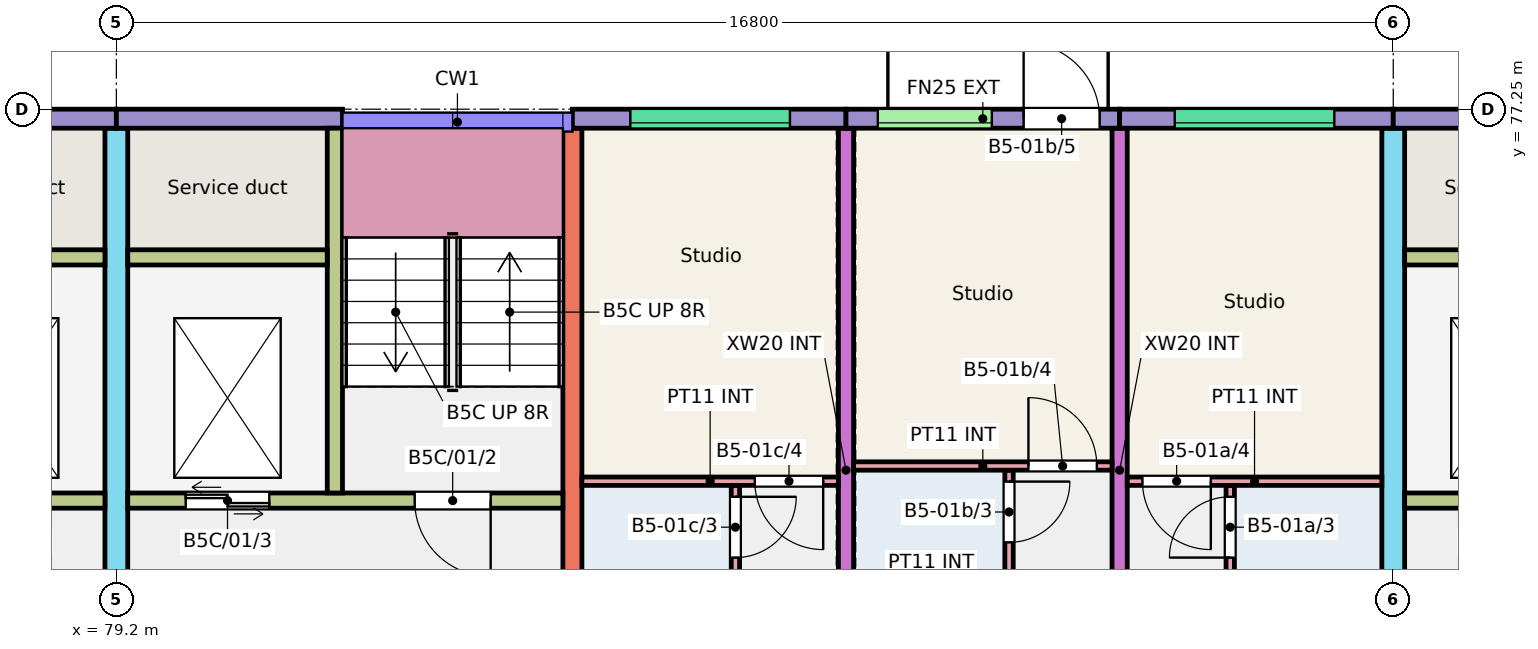
"""IFC4 building model, lengths in metres.
Left out: names, types, materials, properties, quantities, classifications, styles, units other than length and angle.
Written with IfcOpenShell. Run it as: python <this file> out.ifc"""

import sys

from ifc_helpers import new_model, si_unit, direction, frame, frame_2d, origin, place, context, subcontext, project, spatial, rectangle, extrude, element, fill, save


model = new_model("IFC4")
c1 = context("Model", 3, precision=1e-05, world=origin(), true_north=direction((0.0, 1.0)))
c2 = subcontext(c1, "Body", "Model", "MODEL_VIEW")
j1 = project(units=[si_unit("LENGTHUNIT", "METRE"), si_unit("PLANEANGLEUNIT", "RADIAN")], contexts=[c1])
p1 = place(None, origin())
s1 = spatial("IfcSite", under=j1, at=p1, CompositionType="ELEMENT")
p2 = place(p1, origin())
s2 = spatial("IfcBuilding", under=s1, at=p2, CompositionType="ELEMENT")
p3 = place(p2, frame((0.0, 0.0, 3.0)))
s3 = spatial("IfcBuildingStorey", under=s2, at=p3, CompositionType="ELEMENT", Elevation=3.0)
p4 = place(p3, frame((79.2, 66.0, 0.0), z_axis=(0.0, 0.0, 1.0), x_axis=(0.0, 1.0, 0.0)))
e1 = element("IfcWall", 1, at=p4, inside=s3, PredefinedType="SHEAR", context=c2, shape_type="SweptSolid", body=[
    extrude(rectangle(XDim=11.0, YDim=0.3, at=frame_2d((5.5, 0.0))), origin(), (0.0, 0.0, 1.0), 3.0),
])
p5 = place(p4, frame((0.3, 0.0, 0.0)))
e2 = element("IfcOpeningElement", 2, at=p5, cuts=e1, PredefinedType="OPENING", context=c2, shape_type="SweptSolid", body=[
    extrude(rectangle(XDim=1.2, YDim=2.1, at=frame_2d((0.6, 1.05))), frame((0.0, 0.16, 0.0), z_axis=(0.0, -1.0, 0.0), x_axis=(1.0, 0.0, 0.0)), (0.0, 0.0, 1.0), 0.32),
])
p6 = place(p3, frame((85.2, 68.0, 0.0), z_axis=(0.0, 0.0, 1.0), x_axis=(0.0, 1.0, 0.0)))
e3 = element("IfcWall", 3, at=p6, inside=s3, PredefinedType="SHEAR", context=c2, shape_type="SweptSolid", body=[
    extrude(rectangle(XDim=9.0, YDim=0.25, at=frame_2d((4.5, 0.0))), origin(), (0.0, 0.0, 1.0), 3.0),
])
for number, where, z_axis, x_axis in (
    (4, (88.8, 68.0, 0.0), (0.0, 0.0, 1.0), (0.0, 1.0, 0.0)),
    (5, (92.4, 68.0, 0.0), (0.0, 0.0, 1.0), (0.0, 1.0, 0.0)),
):
    element("IfcWall", number, at=place(p3, frame(where, z_axis=z_axis, x_axis=x_axis)), inside=s3, PredefinedType="SHEAR", context=c2, shape_type="SweptSolid", body=[
        extrude(rectangle(XDim=9.0, YDim=0.2, at=frame_2d((4.5, 0.0))), origin(), (0.0, 0.0, 1.0), 3.0),
    ])
p7 = place(p3, frame((96.0, 66.0, 0.0), z_axis=(0.0, 0.0, 1.0), x_axis=(0.0, 1.0, 0.0)))
e6 = element("IfcWall", 6, at=p7, inside=s3, PredefinedType="SHEAR", context=c2, shape_type="SweptSolid", body=[
    extrude(rectangle(XDim=11.0, YDim=0.3, at=frame_2d((5.5, 0.0))), origin(), (0.0, 0.0, 1.0), 3.0),
])
p8 = place(p7, frame((0.3, 0.0, 0.0)))
e7 = element("IfcOpeningElement", 7, at=p8, cuts=e6, PredefinedType="OPENING", context=c2, shape_type="SweptSolid", body=[
    extrude(rectangle(XDim=1.2, YDim=2.1, at=frame_2d((0.6, 1.05))), frame((0.0, 0.16, 0.0), z_axis=(0.0, -1.0, 0.0), x_axis=(1.0, 0.0, 0.0)), (0.0, 0.0, 1.0), 0.32),
])
p9 = place(p3, frame((76.225, 77.125, 0.0), z_axis=(0.0, 0.0, 1.0), x_axis=(1.0, 0.0, 0.0)))
e8 = element("IfcWall", 8, at=p9, inside=s3, PredefinedType="SOLIDWALL", context=c2, shape_type="SweptSolid", body=[
    extrude(rectangle(XDim=2.975, YDim=0.25, at=frame_2d((1.487, 0.0))), origin(), (0.0, 0.0, 1.0), 3.0),
])
p10 = place(p3, frame((73.325, 72.1, 0.0), z_axis=(0.0, 0.0, 1.0), x_axis=(1.0, 0.0, 0.0)))
e9 = element("IfcWall", 9, at=p10, inside=s3, PredefinedType="SHEAR", context=c2, shape_type="SweptSolid", body=[
    extrude(rectangle(XDim=5.725, YDim=0.2, at=frame_2d((2.863, 0.0))), origin(), (0.0, 0.0, 1.0), 3.0),
])
p11 = place(p10, frame((0.95, 0.0, 0.0)))
e10 = element("IfcOpeningElement", 10, at=p11, cuts=e9, PredefinedType="OPENING", context=c2, shape_type="SweptSolid", body=[
    extrude(rectangle(XDim=1.0, YDim=2.1, at=frame_2d((0.5, 1.05))), frame((0.0, 0.11, 0.0), z_axis=(0.0, -1.0, 0.0), x_axis=(1.0, 0.0, 0.0)), (0.0, 0.0, 1.0), 0.22),
])
p12 = place(p10, frame((3.863, 0.0, 0.0)))
e11 = element("IfcOpeningElement", 11, at=p12, cuts=e9, PredefinedType="OPENING", context=c2, shape_type="SweptSolid", body=[
    extrude(rectangle(XDim=1.1, YDim=2.1, at=frame_2d((0.55, 1.05))), frame((0.0, 0.11, 0.0), z_axis=(0.0, -1.0, 0.0), x_axis=(1.0, 0.0, 0.0)), (0.0, 0.0, 1.0), 0.22),
])
p13 = place(p3, frame((76.425, 75.3, 0.0), z_axis=(0.0, 0.0, 1.0), x_axis=(1.0, 0.0, 0.0)))
e12 = element("IfcWall", 12, at=p13, inside=s3, PredefinedType="SHEAR", context=c2, shape_type="SweptSolid", body=[
    extrude(rectangle(XDim=2.625, YDim=0.2, at=frame_2d((1.312, 0.0))), origin(), (0.0, 0.0, 1.0), 3.0),
])
p14 = place(p3, frame((79.2, 77.125, 0.0), z_axis=(0.0, 0.0, 1.0), x_axis=(1.0, 0.0, 0.0)))
e13 = element("IfcWall", 13, at=p14, inside=s3, PredefinedType="SOLIDWALL", context=c2, shape_type="SweptSolid", body=[
    extrude(rectangle(XDim=2.975, YDim=0.25, at=frame_2d((1.488, 0.0))), origin(), (0.0, 0.0, 1.0), 3.0),
])
p15 = place(p3, frame((79.35, 72.1, 0.0), z_axis=(0.0, 0.0, 1.0), x_axis=(1.0, 0.0, 0.0)))
e14 = element("IfcWall", 14, at=p15, inside=s3, PredefinedType="SHEAR", context=c2, shape_type="SweptSolid", body=[
    extrude(rectangle(XDim=5.725, YDim=0.2, at=frame_2d((2.862, 0.0))), origin(), (0.0, 0.0, 1.0), 3.0),
])
p16 = place(p15, frame((3.775, 0.0, 0.0)))
e15 = element("IfcOpeningElement", 15, at=p16, cuts=e14, PredefinedType="OPENING", context=c2, shape_type="SweptSolid", body=[
    extrude(rectangle(XDim=1.0, YDim=2.1, at=frame_2d((0.5, 1.05))), frame((0.0, 0.11, 0.0), z_axis=(0.0, -1.0, 0.0), x_axis=(1.0, 0.0, 0.0)), (0.0, 0.0, 1.0), 0.22),
])
p17 = place(p15, frame((0.762, 0.0, 0.0)))
e16 = element("IfcOpeningElement", 16, at=p17, cuts=e14, PredefinedType="OPENING", context=c2, shape_type="SweptSolid", body=[
    extrude(rectangle(XDim=1.1, YDim=2.1, at=frame_2d((0.55, 1.05))), frame((0.0, 0.11, 0.0), z_axis=(0.0, -1.0, 0.0), x_axis=(1.0, 0.0, 0.0)), (0.0, 0.0, 1.0), 0.22),
])
p18 = place(p3, frame((82.075, 72.2, 0.0), z_axis=(0.0, 0.0, 1.0), x_axis=(0.0, 1.0, 0.0)))
e17 = element("IfcWall", 17, at=p18, inside=s3, PredefinedType="SHEAR", context=c2, shape_type="SweptSolid", body=[
    extrude(rectangle(XDim=4.8, YDim=0.2, at=frame_2d((2.4, 0.0))), origin(), (0.0, 0.0, 1.0), 3.0),
])
p19 = place(p3, frame((79.35, 75.3, 0.0), z_axis=(0.0, 0.0, 1.0), x_axis=(1.0, 0.0, 0.0)))
e18 = element("IfcWall", 18, at=p19, inside=s3, PredefinedType="SHEAR", context=c2, shape_type="SweptSolid", body=[
    extrude(rectangle(XDim=2.625, YDim=0.2, at=frame_2d((1.312, 0.0))), origin(), (0.0, 0.0, 1.0), 3.0),
])
p20 = place(p3, frame((85.2, 77.125, 0.0), z_axis=(0.0, 0.0, 1.0), x_axis=(1.0, 0.0, 0.0)))
e19 = element("IfcWall", 19, at=p20, inside=s3, PredefinedType="SOLIDWALL", context=c2, shape_type="SweptSolid", body=[
    extrude(rectangle(XDim=3.6, YDim=0.25, at=frame_2d((1.8, 0.0))), origin(), (0.0, 0.0, 1.0), 3.0),
])
p21 = place(p20, frame((0.762, 0.0, 1.2)))
e20 = element("IfcOpeningElement", 20, at=p21, cuts=e19, PredefinedType="OPENING", context=c2, shape_type="SweptSolid", body=[
    extrude(rectangle(XDim=2.1, YDim=1.2, at=frame_2d((1.05, 0.6))), frame((0.0, 0.135, 0.0), z_axis=(0.0, -1.0, 0.0), x_axis=(1.0, 0.0, 0.0)), (0.0, 0.0, 1.0), 0.27),
])
p22 = place(p3, frame((88.8, 77.125, 0.0), z_axis=(0.0, 0.0, 1.0), x_axis=(1.0, 0.0, 0.0)))
e21 = element("IfcWall", 21, at=p22, inside=s3, PredefinedType="SOLIDWALL", context=c2, shape_type="SweptSolid", body=[
    extrude(rectangle(XDim=3.6, YDim=0.25, at=frame_2d((1.8, 0.0))), origin(), (0.0, 0.0, 1.0), 3.0),
])
p23 = place(p22, frame((0.418, 0.0, 1.2)))
e22 = element("IfcOpeningElement", 22, at=p23, cuts=e21, PredefinedType="OPENING", context=c2, shape_type="SweptSolid", body=[
    extrude(rectangle(XDim=1.5, YDim=1.2, at=frame_2d((0.75, 0.6))), frame((0.0, 0.135, 0.0), z_axis=(0.0, -1.0, 0.0), x_axis=(1.0, 0.0, 0.0)), (0.0, 0.0, 1.0), 0.27),
])
p24 = place(p22, frame((2.337, 0.0, 0.0)))
e23 = element("IfcOpeningElement", 23, at=p24, cuts=e21, PredefinedType="OPENING", context=c2, shape_type="SweptSolid", body=[
    extrude(rectangle(XDim=1.0, YDim=2.1, at=frame_2d((0.5, 1.05))), frame((0.0, 0.135, 0.0), z_axis=(0.0, -1.0, 0.0), x_axis=(1.0, 0.0, 0.0)), (0.0, 0.0, 1.0), 0.27),
])
p25 = place(p3, frame((92.4, 77.125, 0.0), z_axis=(0.0, 0.0, 1.0), x_axis=(1.0, 0.0, 0.0)))
e24 = element("IfcWall", 24, at=p25, inside=s3, PredefinedType="SOLIDWALL", context=c2, shape_type="SweptSolid", body=[
    extrude(rectangle(XDim=3.6, YDim=0.25, at=frame_2d((1.8, 0.0))), origin(), (0.0, 0.0, 1.0), 3.0),
])
p26 = place(p25, frame((0.725, 0.0, 1.2)))
e25 = element("IfcOpeningElement", 25, at=p26, cuts=e24, PredefinedType="OPENING", context=c2, shape_type="SweptSolid", body=[
    extrude(rectangle(XDim=2.1, YDim=1.2, at=frame_2d((1.05, 0.6))), frame((0.0, 0.135, 0.0), z_axis=(0.0, -1.0, 0.0), x_axis=(1.0, 0.0, 0.0)), (0.0, 0.0, 1.0), 0.27),
])
p27 = place(p3, frame((96.0, 77.125, 0.0), z_axis=(0.0, 0.0, 1.0), x_axis=(1.0, 0.0, 0.0)))
e26 = element("IfcWall", 26, at=p27, inside=s3, PredefinedType="SOLIDWALL", context=c2, shape_type="SweptSolid", body=[
    extrude(rectangle(XDim=2.975, YDim=0.25, at=frame_2d((1.488, 0.0))), origin(), (0.0, 0.0, 1.0), 3.0),
])
p28 = place(p3, frame((96.15, 72.1, 0.0), z_axis=(0.0, 0.0, 1.0), x_axis=(1.0, 0.0, 0.0)))
e27 = element("IfcWall", 27, at=p28, inside=s3, PredefinedType="SHEAR", context=c2, shape_type="SweptSolid", body=[
    extrude(rectangle(XDim=5.725, YDim=0.2, at=frame_2d((2.863, 0.0))), origin(), (0.0, 0.0, 1.0), 3.0),
])
p29 = place(p28, frame((3.775, 0.0, 0.0)))
e28 = element("IfcOpeningElement", 28, at=p29, cuts=e27, PredefinedType="OPENING", context=c2, shape_type="SweptSolid", body=[
    extrude(rectangle(XDim=1.0, YDim=2.1, at=frame_2d((0.5, 1.05))), frame((0.0, 0.11, 0.0), z_axis=(0.0, -1.0, 0.0), x_axis=(1.0, 0.0, 0.0)), (0.0, 0.0, 1.0), 0.22),
])
p30 = place(p28, frame((0.762, 0.0, 0.0)))
e29 = element("IfcOpeningElement", 29, at=p30, cuts=e27, PredefinedType="OPENING", context=c2, shape_type="SweptSolid", body=[
    extrude(rectangle(XDim=1.1, YDim=2.1, at=frame_2d((0.55, 1.05))), frame((0.0, 0.11, 0.0), z_axis=(0.0, -1.0, 0.0), x_axis=(1.0, 0.0, 0.0)), (0.0, 0.0, 1.0), 0.22),
])
p31 = place(p3, frame((96.15, 75.3, 0.0), z_axis=(0.0, 0.0, 1.0), x_axis=(1.0, 0.0, 0.0)))
e30 = element("IfcWall", 30, at=p31, inside=s3, PredefinedType="SHEAR", context=c2, shape_type="SweptSolid", body=[
    extrude(rectangle(XDim=2.625, YDim=0.2, at=frame_2d((1.312, 0.0))), origin(), (0.0, 0.0, 1.0), 3.0),
])
p32 = place(p3, frame((93.855, 68.0, 0.0), z_axis=(0.0, 0.0, 1.0), x_axis=(0.0, 1.0, 0.0)))
e31 = element("IfcWall", 31, at=p32, inside=s3, PredefinedType="PARTITIONING", context=c2, shape_type="SweptSolid", body=[
    extrude(rectangle(XDim=4.3, YDim=0.11, at=frame_2d((2.15, 0.0))), origin(), (0.0, 0.0, 1.0), 2.8),
])
p33 = place(p32, frame((0.2, 0.0, 0.0)))
e32 = element("IfcOpeningElement", 32, at=p33, cuts=e31, PredefinedType="OPENING", context=c2, shape_type="SweptSolid", body=[
    extrude(rectangle(XDim=0.8, YDim=2.1, at=frame_2d((0.4, 1.05))), frame((0.0, 0.065, 0.0), z_axis=(0.0, -1.0, 0.0), x_axis=(1.0, 0.0, 0.0)), (0.0, 0.0, 1.0), 0.13),
])
p34 = place(p32, frame((3.35, 0.0, 0.0)))
e33 = element("IfcOpeningElement", 33, at=p34, cuts=e31, PredefinedType="OPENING", context=c2, shape_type="SweptSolid", body=[
    extrude(rectangle(XDim=0.8, YDim=2.1, at=frame_2d((0.4, 1.05))), frame((0.0, 0.065, 0.0), z_axis=(0.0, -1.0, 0.0), x_axis=(1.0, 0.0, 0.0)), (0.0, 0.0, 1.0), 0.13),
])
p35 = place(p3, frame((92.5, 72.355, 0.0), z_axis=(0.0, 0.0, 1.0), x_axis=(1.0, 0.0, 0.0)))
e34 = element("IfcWall", 34, at=p35, inside=s3, PredefinedType="PARTITIONING", context=c2, shape_type="SweptSolid", body=[
    extrude(rectangle(XDim=3.35, YDim=0.11, at=frame_2d((1.675, 0.0))), origin(), (0.0, 0.0, 1.0), 2.8),
])
p36 = place(p35, frame((0.2, 0.0, 0.0)))
e35 = element("IfcOpeningElement", 35, at=p36, cuts=e34, PredefinedType="OPENING", context=c2, shape_type="SweptSolid", body=[
    extrude(rectangle(XDim=0.9, YDim=2.1, at=frame_2d((0.45, 1.05))), frame((0.0, 0.065, 0.0), z_axis=(0.0, -1.0, 0.0), x_axis=(1.0, 0.0, 0.0)), (0.0, 0.0, 1.0), 0.13),
])
p37 = place(p3, frame((90.945, 68.0, 0.0), z_axis=(0.0, 0.0, 1.0), x_axis=(0.0, 1.0, 0.0)))
e36 = element("IfcWall", 36, at=p37, inside=s3, PredefinedType="PARTITIONING", context=c2, shape_type="SweptSolid", body=[
    extrude(rectangle(XDim=4.5, YDim=0.11, at=frame_2d((2.25, 0.0))), origin(), (0.0, 0.0, 1.0), 2.8),
])
p38 = place(p37, frame((0.2, 0.0, 0.0)))
e37 = element("IfcOpeningElement", 37, at=p38, cuts=e36, PredefinedType="OPENING", context=c2, shape_type="SweptSolid", body=[
    extrude(rectangle(XDim=0.8, YDim=2.1, at=frame_2d((0.4, 1.05))), frame((0.0, 0.065, 0.0), z_axis=(0.0, -1.0, 0.0), x_axis=(1.0, 0.0, 0.0)), (0.0, 0.0, 1.0), 0.13),
])
p39 = place(p37, frame((3.55, 0.0, 0.0)))
e38 = element("IfcOpeningElement", 38, at=p39, cuts=e36, PredefinedType="OPENING", context=c2, shape_type="SweptSolid", body=[
    extrude(rectangle(XDim=0.8, YDim=2.1, at=frame_2d((0.4, 1.05))), frame((0.0, 0.065, 0.0), z_axis=(0.0, -1.0, 0.0), x_axis=(1.0, 0.0, 0.0)), (0.0, 0.0, 1.0), 0.13),
])
p40 = place(p3, frame((88.9, 72.555, 0.0), z_axis=(0.0, 0.0, 1.0), x_axis=(1.0, 0.0, 0.0)))
e39 = element("IfcWall", 39, at=p40, inside=s3, PredefinedType="PARTITIONING", context=c2, shape_type="SweptSolid", body=[
    extrude(rectangle(XDim=3.4, YDim=0.11, at=frame_2d((1.7, 0.0))), origin(), (0.0, 0.0, 1.0), 2.8),
])
p41 = place(p40, frame((2.3, 0.0, 0.0)))
e40 = element("IfcOpeningElement", 40, at=p41, cuts=e39, PredefinedType="OPENING", context=c2, shape_type="SweptSolid", body=[
    extrude(rectangle(XDim=0.9, YDim=2.1, at=frame_2d((0.45, 1.05))), frame((0.0, 0.065, 0.0), z_axis=(0.0, -1.0, 0.0), x_axis=(1.0, 0.0, 0.0)), (0.0, 0.0, 1.0), 0.13),
])
p42 = place(p3, frame((87.345, 68.0, 0.0), z_axis=(0.0, 0.0, 1.0), x_axis=(0.0, 1.0, 0.0)))
e41 = element("IfcWall", 41, at=p42, inside=s3, PredefinedType="PARTITIONING", context=c2, shape_type="SweptSolid", body=[
    extrude(rectangle(XDim=4.3, YDim=0.11, at=frame_2d((2.15, 0.0))), origin(), (0.0, 0.0, 1.0), 2.8),
])
p43 = place(p42, frame((0.2, 0.0, 0.0)))
e42 = element("IfcOpeningElement", 42, at=p43, cuts=e41, PredefinedType="OPENING", context=c2, shape_type="SweptSolid", body=[
    extrude(rectangle(XDim=0.8, YDim=2.1, at=frame_2d((0.4, 1.05))), frame((0.0, 0.065, 0.0), z_axis=(0.0, -1.0, 0.0), x_axis=(1.0, 0.0, 0.0)), (0.0, 0.0, 1.0), 0.13),
])
p44 = place(p42, frame((3.35, 0.0, 0.0)))
e43 = element("IfcOpeningElement", 43, at=p44, cuts=e41, PredefinedType="OPENING", context=c2, shape_type="SweptSolid", body=[
    extrude(rectangle(XDim=0.8, YDim=2.1, at=frame_2d((0.4, 1.05))), frame((0.0, 0.065, 0.0), z_axis=(0.0, -1.0, 0.0), x_axis=(1.0, 0.0, 0.0)), (0.0, 0.0, 1.0), 0.13),
])
p45 = place(p3, frame((85.325, 72.355, 0.0), z_axis=(0.0, 0.0, 1.0), x_axis=(1.0, 0.0, 0.0)))
e44 = element("IfcWall", 44, at=p45, inside=s3, PredefinedType="PARTITIONING", context=c2, shape_type="SweptSolid", body=[
    extrude(rectangle(XDim=3.375, YDim=0.11, at=frame_2d((1.688, 0.0))), origin(), (0.0, 0.0, 1.0), 2.8),
])
p46 = place(p45, frame((2.275, 0.0, 0.0)))
e45 = element("IfcOpeningElement", 45, at=p46, cuts=e44, PredefinedType="OPENING", context=c2, shape_type="SweptSolid", body=[
    extrude(rectangle(XDim=0.9, YDim=2.1, at=frame_2d((0.45, 1.05))), frame((0.0, 0.065, 0.0), z_axis=(0.0, -1.0, 0.0), x_axis=(1.0, 0.0, 0.0)), (0.0, 0.0, 1.0), 0.13),
])
p47 = place(p26, origin())
e46 = element("IfcWindow", 46, at=p47, inside=s3, PartitioningType="SINGLE_PANEL", PredefinedType="WINDOW", context=c2, shape_type="SweptSolid", body=[
    extrude(rectangle(XDim=2.1, YDim=1.2, at=frame_2d((1.05, 0.6))), frame((0.0, -0.025, 0.0), z_axis=(0.0, -1.0, 0.0), x_axis=(1.0, 0.0, 0.0)), (0.0, 0.0, 1.0), 0.06),
])
fill(e25, e46)
p48 = place(p23, origin())
e47 = element("IfcWindow", 47, at=p48, inside=s3, PartitioningType="SINGLE_PANEL", PredefinedType="WINDOW", context=c2, shape_type="SweptSolid", body=[
    extrude(rectangle(XDim=1.5, YDim=1.2, at=frame_2d((0.75, 0.6))), frame((0.0, -0.025, 0.0), z_axis=(0.0, -1.0, 0.0), x_axis=(1.0, 0.0, 0.0)), (0.0, 0.0, 1.0), 0.06),
])
fill(e22, e47)
p49 = place(p21, origin())
e48 = element("IfcWindow", 48, at=p49, inside=s3, PartitioningType="SINGLE_PANEL", PredefinedType="WINDOW", context=c2, shape_type="SweptSolid", body=[
    extrude(rectangle(XDim=2.1, YDim=1.2, at=frame_2d((1.05, 0.6))), frame((0.0, -0.025, 0.0), z_axis=(0.0, -1.0, 0.0), x_axis=(1.0, 0.0, 0.0)), (0.0, 0.0, 1.0), 0.06),
])
fill(e20, e48)
p50 = place(p34, origin())
e49 = element("IfcDoor", 49, at=p50, inside=s3, OperationType="SINGLE_SWING_LEFT", PredefinedType="DOOR", context=c2, shape_type="SweptSolid", body=[
    extrude(rectangle(XDim=0.8, YDim=2.1, at=frame_2d((0.4, 1.05))), frame((0.0, 0.025, 0.0), z_axis=(0.0, -1.0, 0.0), x_axis=(1.0, 0.0, 0.0)), (0.0, 0.0, 1.0), 0.05),
])
fill(e33, e49)
p51 = place(p36, origin())
e50 = element("IfcDoor", 50, at=p51, inside=s3, OperationType="SINGLE_SWING_RIGHT", PredefinedType="DOOR", context=c2, shape_type="SweptSolid", body=[
    extrude(rectangle(XDim=0.9, YDim=2.1, at=frame_2d((0.45, 1.05))), frame((0.0, 0.025, 0.0), z_axis=(0.0, -1.0, 0.0), x_axis=(1.0, 0.0, 0.0)), (0.0, 0.0, 1.0), 0.05),
])
fill(e35, e50)
p52 = place(p39, origin())
e51 = element("IfcDoor", 51, at=p52, inside=s3, OperationType="SINGLE_SWING_RIGHT", PredefinedType="DOOR", context=c2, shape_type="SweptSolid", body=[
    extrude(rectangle(XDim=0.8, YDim=2.1, at=frame_2d((0.4, 1.05))), frame((0.0, 0.025, 0.0), z_axis=(0.0, -1.0, 0.0), x_axis=(1.0, 0.0, 0.0)), (0.0, 0.0, 1.0), 0.05),
])
fill(e38, e51)
p53 = place(p41, origin())
e52 = element("IfcDoor", 52, at=p53, inside=s3, OperationType="SINGLE_SWING_LEFT", PredefinedType="DOOR", context=c2, shape_type="SweptSolid", body=[
    extrude(rectangle(XDim=0.9, YDim=2.1, at=frame_2d((0.45, 1.05))), frame((0.0, 0.025, 0.0), z_axis=(0.0, -1.0, 0.0), x_axis=(1.0, 0.0, 0.0)), (0.0, 0.0, 1.0), 0.05),
])
fill(e40, e52)
p54 = place(p24, origin())
e53 = element("IfcDoor", 53, at=p54, inside=s3, OperationType="SINGLE_SWING_LEFT", PredefinedType="DOOR", context=c2, shape_type="SweptSolid", body=[
    extrude(rectangle(XDim=1.0, YDim=2.1, at=frame_2d((0.5, 1.05))), frame((0.0, 0.025, 0.0), z_axis=(0.0, -1.0, 0.0), x_axis=(1.0, 0.0, 0.0)), (0.0, 0.0, 1.0), 0.05),
])
fill(e23, e53)
p55 = place(p44, origin())
e54 = element("IfcDoor", 54, at=p55, inside=s3, OperationType="SINGLE_SWING_RIGHT", PredefinedType="DOOR", context=c2, shape_type="SweptSolid", body=[
    extrude(rectangle(XDim=0.8, YDim=2.1, at=frame_2d((0.4, 1.05))), frame((0.0, 0.025, 0.0), z_axis=(0.0, -1.0, 0.0), x_axis=(1.0, 0.0, 0.0)), (0.0, 0.0, 1.0), 0.05),
])
fill(e43, e54)
p56 = place(p46, origin())
e55 = element("IfcDoor", 55, at=p56, inside=s3, OperationType="SINGLE_SWING_RIGHT", PredefinedType="DOOR", context=c2, shape_type="SweptSolid", body=[
    extrude(rectangle(XDim=0.9, YDim=2.1, at=frame_2d((0.45, 1.05))), frame((0.0, 0.025, 0.0), z_axis=(0.0, -1.0, 0.0), x_axis=(1.0, 0.0, 0.0)), (0.0, 0.0, 1.0), 0.05),
])
fill(e45, e55)
p57 = place(p16, origin())
e56 = element("IfcDoor", 56, at=p57, inside=s3, OperationType="SINGLE_SWING_RIGHT", PredefinedType="DOOR", context=c2, shape_type="SweptSolid", body=[
    extrude(rectangle(XDim=1.0, YDim=2.1, at=frame_2d((0.5, 1.05))), frame((0.0, 0.025, 0.0), z_axis=(0.0, -1.0, 0.0), x_axis=(1.0, 0.0, 0.0)), (0.0, 0.0, 1.0), 0.05),
])
fill(e15, e56)
p58 = place(p17, origin())
e57 = element("IfcDoor", 57, at=p58, inside=s3, OperationType="DOUBLE_DOOR_SLIDING", PredefinedType="DOOR", context=c2, shape_type="SweptSolid", body=[
    extrude(rectangle(XDim=1.1, YDim=2.1, at=frame_2d((0.55, 1.05))), frame((0.0, 0.025, 0.0), z_axis=(0.0, -1.0, 0.0), x_axis=(1.0, 0.0, 0.0)), (0.0, 0.0, 1.0), 0.05),
])
fill(e16, e57)
save(model, sys.argv[1])
